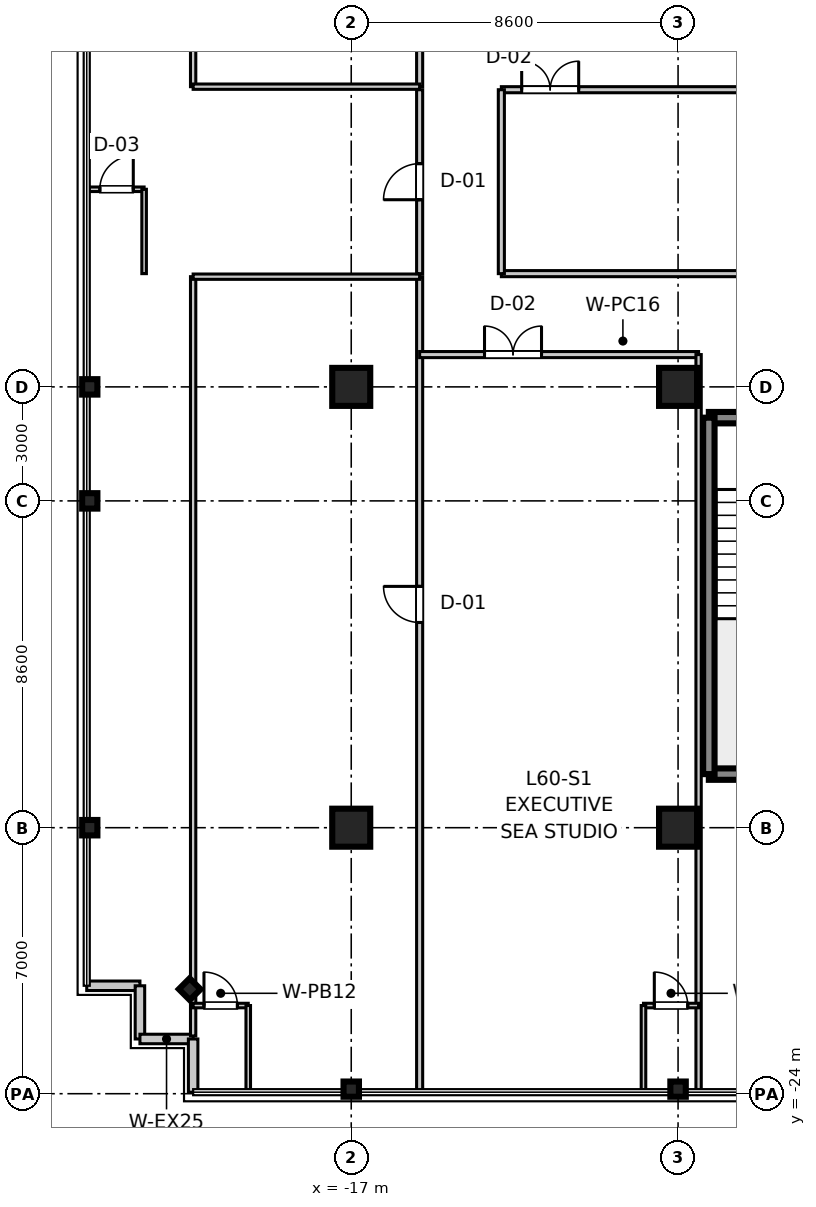
"""IFC4 building model, lengths in metres.
Left out: names, types, materials, properties, quantities, classifications, styles, units other than length and angle.
Written with IfcOpenShell. Run it as: python <this file> out.ifc"""

import sys

from ifc_helpers import new_model, si_unit, direction, frame, frame_2d, origin, origin_2d, place, context, subcontext, project, spatial, rectangle, i_section, extrude, source, transform, mapped, element, fill, save


model = new_model("IFC4")
c1 = context("Model", 3, precision=1e-05, world=origin(), true_north=direction((0.0, 1.0)))
c2 = subcontext(c1, "Body", "Model", "MODEL_VIEW")
j1 = project(units=[si_unit("LENGTHUNIT", "METRE"), si_unit("PLANEANGLEUNIT", "RADIAN")], contexts=[c1])
p1 = place(None, origin())
s1 = spatial("IfcSite", under=j1, at=p1, CompositionType="ELEMENT")
p2 = place(p1, origin())
s2 = spatial("IfcBuilding", under=s1, at=p2, CompositionType="ELEMENT")
p3 = place(p2, frame((0.0, 0.0, 234.5)))
s3 = spatial("IfcBuildingStorey", under=s2, at=p3, CompositionType="ELEMENT", Elevation=234.5)
m1 = source(origin(), c2, "Body", "SweptSolid", [
    extrude(rectangle(XDim=1.0, YDim=1.0, at=origin_2d()), origin(), (0.0, 0.0, 1.0), 3.655),
])
for number, where, z_axis, x_axis in (
    (1, (-17.0, -17.0, 0.0), (0.0, 0.0, 1.0), (1.0, 0.0, 0.0)),
    (2, (-17.0, -5.4, 0.0), (0.0, 0.0, 1.0), (1.0, 0.0, 0.0)),
    (3, (-8.4, -17.0, 0.0), (0.0, 0.0, 1.0), (1.0, 0.0, 0.0)),
    (4, (-8.4, -5.4, 0.0), (0.0, 0.0, 1.0), (1.0, 0.0, 0.0)),
):
    element("IfcColumn", number, at=place(p3, frame(where, z_axis=z_axis, x_axis=x_axis)), inside=s3, PredefinedType="COLUMN", context=c2, shape_type="MappedRepresentation", body=[
        mapped(m1, transform((0.0, 0.0, 0.0), scale=1.0)),
    ])
m2 = source(origin(), c2, "Body", "SweptSolid", [
    extrude(i_section(OverallWidth=0.401, OverallDepth=0.406, WebThickness=0.016, FlangeThickness=0.025, at=origin_2d()), origin(), (0.0, 0.0, 1.0), 3.655),
])
for number, where, z_axis, x_axis in (
    (5, (-23.88, -17.0, 0.0), (0.0, 0.0, 1.0), (1.0, 0.0, 0.0)),
    (6, (-23.88, -8.4, 0.0), (0.0, 0.0, 1.0), (1.0, 0.0, 0.0)),
    (7, (-23.88, -5.4, 0.0), (0.0, 0.0, 1.0), (1.0, 0.0, 0.0)),
    (8, (-17.0, -23.88, 0.0), (0.0, 0.0, 1.0), (0.0, 1.0, 0.0)),
    (9, (-8.4, -23.88, 0.0), (0.0, 0.0, 1.0), (0.0, 1.0, 0.0)),
    (10, (-21.25, -21.25, 0.0), (0.0, 0.0, 1.0), (0.707, 0.707, 0.0)),
):
    element("IfcColumn", number, at=place(p3, frame(where, z_axis=z_axis, x_axis=x_axis)), inside=s3, PredefinedType="COLUMN", context=c2, shape_type="MappedRepresentation", body=[
        mapped(m2, transform((0.0, 0.0, 0.0), scale=1.0)),
    ])
m3 = source(origin(), c2, "Body", "SweptSolid", [
    extrude(rectangle(XDim=3.98, YDim=0.3, at=frame_2d((1.99, 0.0))), origin(), (0.0, 0.0, 1.0), 3.41),
])
p4 = place(p3, frame((-7.59, -15.59, 0.0), z_axis=(0.0, 0.0, 1.0), x_axis=(1.0, 0.0, 0.0)))
e11 = element("IfcWall", 11, at=p4, inside=s3, PredefinedType="SHEAR", context=c2, shape_type="MappedRepresentation", body=[
    mapped(m3, transform((0.0, 0.0, 0.0), scale=1.0)),
])
p5 = place(p3, frame((-7.59, -6.21, 0.0), z_axis=(0.0, 0.0, 1.0), x_axis=(1.0, 0.0, 0.0)))
e12 = element("IfcWall", 12, at=p5, inside=s3, PredefinedType="SHEAR", context=c2, shape_type="MappedRepresentation", body=[
    mapped(m3, transform((0.0, 0.0, 0.0), scale=1.0)),
])
p6 = place(p5, frame((1.44, 0.0, 0.0)))
e13 = element("IfcOpeningElement", 13, at=p6, cuts=e12, PredefinedType="OPENING", context=c2, shape_type="SweptSolid", body=[
    extrude(rectangle(XDim=1.1, YDim=2.15, at=frame_2d((0.55, 1.075))), frame((0.0, 0.16, 0.0), z_axis=(0.0, -1.0, 0.0), x_axis=(1.0, 0.0, 0.0)), (0.0, 0.0, 1.0), 0.32),
])
m4 = source(origin(), c2, "Body", "SweptSolid", [
    extrude(rectangle(XDim=9.38, YDim=0.3, at=frame_2d((4.69, 0.0))), origin(), (0.0, 0.0, 1.0), 3.41),
])
p7 = place(p3, frame((-7.59, -15.59, 0.0), z_axis=(0.0, 0.0, 1.0), x_axis=(0.0, 1.0, 0.0)))
e14 = element("IfcWall", 14, at=p7, inside=s3, PredefinedType="SHEAR", context=c2, shape_type="MappedRepresentation", body=[
    mapped(m4, transform((0.0, 0.0, 0.0), scale=1.0)),
])
m5 = source(origin(), c2, "Body", "SweptSolid", [
    extrude(rectangle(XDim=1.4, YDim=0.25, at=frame_2d((0.7, 0.0))), origin(), (0.0, 0.0, 1.0), 3.41),
])
p8 = place(p3, frame((-23.96, -21.16, 0.0), z_axis=(0.0, 0.0, 1.0), x_axis=(1.0, 0.0, 0.0)))
e15 = element("IfcWall", 15, at=p8, inside=s3, PredefinedType="STANDARD", context=c2, shape_type="MappedRepresentation", body=[
    mapped(m5, transform((0.0, 0.0, 0.0), scale=1.0)),
])
m6 = source(origin(), c2, "Body", "SweptSolid", [
    extrude(rectangle(XDim=1.4, YDim=0.25, at=frame_2d((0.7, 0.0))), origin(), (0.0, 0.0, 1.0), 3.41),
])
for number, where, z_axis, x_axis in (
    (16, (-22.56, -22.56, 0.0), (0.0, 0.0, 1.0), (0.0, 1.0, 0.0)),
    (17, (-22.56, -22.56, 0.0), (0.0, 0.0, 1.0), (1.0, 0.0, 0.0)),
):
    element("IfcWall", number, at=place(p3, frame(where, z_axis=z_axis, x_axis=x_axis)), inside=s3, PredefinedType="STANDARD", context=c2, shape_type="MappedRepresentation", body=[
        mapped(m6, transform((0.0, 0.0, 0.0), scale=1.0)),
    ])
p9 = place(p3, frame((-21.16, -23.96, 0.0), z_axis=(0.0, 0.0, 1.0), x_axis=(0.0, 1.0, 0.0)))
e18 = element("IfcWall", 18, at=p9, inside=s3, PredefinedType="STANDARD", context=c2, shape_type="MappedRepresentation", body=[
    mapped(m5, transform((0.0, 0.0, 0.0), scale=1.0)),
])
m7 = source(origin(), c2, "Body", "SweptSolid", [
    extrude(rectangle(XDim=21.4, YDim=0.16, at=frame_2d((10.7, 0.0))), origin(), (0.0, 0.0, 1.0), 2.75),
])
p10 = place(p3, frame((-15.2, 2.5, 0.0), z_axis=(0.0, 0.0, 1.0), x_axis=(0.0, 1.0, 0.0)))
e19 = element("IfcWall", 19, at=p10, inside=s3, PredefinedType="PARTITIONING", context=c2, shape_type="MappedRepresentation", body=[
    mapped(m7, transform((0.0, 0.0, 0.0), scale=1.0)),
])
p11 = place(p10, frame((8.15, 0.0, 0.0)))
e20 = element("IfcOpeningElement", 20, at=p11, cuts=e19, PredefinedType="OPENING", context=c2, shape_type="SweptSolid", body=[
    extrude(rectangle(XDim=0.95, YDim=2.1, at=frame_2d((0.475, 1.05))), frame((0.0, 0.09, 0.0), z_axis=(0.0, -1.0, 0.0), x_axis=(1.0, 0.0, 0.0)), (0.0, 0.0, 1.0), 0.18),
])
m8 = source(origin(), c2, "Body", "SweptSolid", [
    extrude(rectangle(XDim=19.98, YDim=0.14, at=frame_2d((9.99, 0.0))), origin(), (0.0, 0.0, 1.0), 2.75),
])
p12 = place(p3, frame((-21.16, 2.5, 0.0), z_axis=(0.0, 0.0, 1.0), x_axis=(0.0, 1.0, 0.0)))
e21 = element("IfcWall", 21, at=p12, inside=s3, PredefinedType="PARTITIONING", context=c2, shape_type="MappedRepresentation", body=[
    mapped(m8, transform((0.0, 0.0, 0.0), scale=1.0)),
])
m9 = source(origin(), c2, "Body", "SweptSolid", [
    extrude(rectangle(XDim=5.96, YDim=0.14, at=frame_2d((2.98, 0.0))), origin(), (0.0, 0.0, 1.0), 2.75),
])
p13 = place(p3, frame((-21.16, 2.5, 0.0), z_axis=(0.0, 0.0, 1.0), x_axis=(1.0, 0.0, 0.0)))
e22 = element("IfcWall", 22, at=p13, inside=s3, PredefinedType="PARTITIONING", context=c2, shape_type="MappedRepresentation", body=[
    mapped(m9, transform((0.0, 0.0, 0.0), scale=1.0)),
])
p14 = place(p3, frame((-15.2, -23.9, 0.0), z_axis=(0.0, 0.0, 1.0), x_axis=(0.0, 1.0, 0.0)))
e23 = element("IfcWall", 23, at=p14, inside=s3, PredefinedType="PARTITIONING", context=c2, shape_type="MappedRepresentation", body=[
    mapped(m7, transform((0.0, 0.0, 0.0), scale=1.0)),
])
p15 = place(p14, frame((12.3, 0.0, 0.0)))
e24 = element("IfcOpeningElement", 24, at=p15, cuts=e23, PredefinedType="OPENING", context=c2, shape_type="SweptSolid", body=[
    extrude(rectangle(XDim=0.95, YDim=2.1, at=frame_2d((0.475, 1.05))), frame((0.0, 0.09, 0.0), z_axis=(0.0, -1.0, 0.0), x_axis=(1.0, 0.0, 0.0)), (0.0, 0.0, 1.0), 0.18),
])
p16 = place(p3, frame((-21.16, -22.48, 0.0), z_axis=(0.0, 0.0, 1.0), x_axis=(0.0, 1.0, 0.0)))
e25 = element("IfcWall", 25, at=p16, inside=s3, PredefinedType="PARTITIONING", context=c2, shape_type="MappedRepresentation", body=[
    mapped(m8, transform((0.0, 0.0, 0.0), scale=1.0)),
])
p17 = place(p3, frame((-21.16, -2.5, 0.0), z_axis=(0.0, 0.0, 1.0), x_axis=(1.0, 0.0, 0.0)))
e26 = element("IfcWall", 26, at=p17, inside=s3, PredefinedType="PARTITIONING", context=c2, shape_type="MappedRepresentation", body=[
    mapped(m9, transform((0.0, 0.0, 0.0), scale=1.0)),
])
m10 = source(origin(), c2, "Body", "SweptSolid", [
    extrude(rectangle(XDim=1.45, YDim=0.12, at=frame_2d((0.725, 0.0))), origin(), (0.0, 0.0, 1.0), 2.75),
])
p18 = place(p3, frame((-21.16, -21.68, 0.0), z_axis=(0.0, 0.0, 1.0), x_axis=(1.0, 0.0, 0.0)))
e27 = element("IfcWall", 27, at=p18, inside=s3, PredefinedType="PARTITIONING", context=c2, shape_type="MappedRepresentation", body=[
    mapped(m10, transform((0.0, 0.0, 0.0), scale=1.0)),
])
p19 = place(p18, frame((0.285, 0.0, 0.0)))
e28 = element("IfcOpeningElement", 28, at=p19, cuts=e27, PredefinedType="OPENING", context=c2, shape_type="SweptSolid", body=[
    extrude(rectangle(XDim=0.88, YDim=2.1, at=frame_2d((0.44, 1.05))), frame((0.0, 0.07, 0.0), z_axis=(0.0, -1.0, 0.0), x_axis=(1.0, 0.0, 0.0)), (0.0, 0.0, 1.0), 0.14),
])
m11 = source(origin(), c2, "Body", "SweptSolid", [
    extrude(rectangle(XDim=2.22, YDim=0.12, at=frame_2d((1.11, 0.0))), origin(), (0.0, 0.0, 1.0), 2.75),
])
p20 = place(p3, frame((-19.71, -23.9, 0.0), z_axis=(0.0, 0.0, 1.0), x_axis=(0.0, 1.0, 0.0)))
e29 = element("IfcWall", 29, at=p20, inside=s3, PredefinedType="PARTITIONING", context=c2, shape_type="MappedRepresentation", body=[
    mapped(m11, transform((0.0, 0.0, 0.0), scale=1.0)),
])
m12 = source(origin(), c2, "Body", "SweptSolid", [
    extrude(rectangle(XDim=7.34, YDim=0.16, at=frame_2d((3.67, 0.0))), origin(), (0.0, 0.0, 1.0), 2.75),
])
p21 = place(p3, frame((-15.2, -4.55, 0.0), z_axis=(0.0, 0.0, 1.0), x_axis=(1.0, 0.0, 0.0)))
e30 = element("IfcWall", 30, at=p21, inside=s3, PredefinedType="PARTITIONING", context=c2, shape_type="MappedRepresentation", body=[
    mapped(m12, transform((0.0, 0.0, 0.0), scale=1.0)),
])
p22 = place(p21, frame((1.707, 0.0, 0.0)))
e31 = element("IfcOpeningElement", 31, at=p22, cuts=e30, PredefinedType="OPENING", context=c2, shape_type="SweptSolid", body=[
    extrude(rectangle(XDim=1.5, YDim=2.15, at=frame_2d((0.75, 1.075))), frame((0.0, 0.09, 0.0), z_axis=(0.0, -1.0, 0.0), x_axis=(1.0, 0.0, 0.0)), (0.0, 0.0, 1.0), 0.18),
])
m13 = source(origin(), c2, "Body", "SweptSolid", [
    extrude(rectangle(XDim=19.35, YDim=0.14, at=frame_2d((9.675, 0.0))), origin(), (0.0, 0.0, 1.0), 2.75),
])
p23 = place(p3, frame((-7.86, -23.9, 0.0), z_axis=(0.0, 0.0, 1.0), x_axis=(0.0, 1.0, 0.0)))
e32 = element("IfcWall", 32, at=p23, inside=s3, PredefinedType="PARTITIONING", context=c2, shape_type="MappedRepresentation", body=[
    mapped(m13, transform((0.0, 0.0, 0.0), scale=1.0)),
])
p24 = place(p3, frame((-9.31, -21.68, 0.0), z_axis=(0.0, 0.0, 1.0), x_axis=(1.0, 0.0, 0.0)))
e33 = element("IfcWall", 33, at=p24, inside=s3, PredefinedType="PARTITIONING", context=c2, shape_type="MappedRepresentation", body=[
    mapped(m10, transform((0.0, 0.0, 0.0), scale=1.0)),
])
p25 = place(p24, frame((0.285, 0.0, 0.0)))
e34 = element("IfcOpeningElement", 34, at=p25, cuts=e33, PredefinedType="OPENING", context=c2, shape_type="SweptSolid", body=[
    extrude(rectangle(XDim=0.88, YDim=2.1, at=frame_2d((0.44, 1.05))), frame((0.0, 0.07, 0.0), z_axis=(0.0, -1.0, 0.0), x_axis=(1.0, 0.0, 0.0)), (0.0, 0.0, 1.0), 0.14),
])
p26 = place(p3, frame((-9.31, -23.9, 0.0), z_axis=(0.0, 0.0, 1.0), x_axis=(0.0, 1.0, 0.0)))
e35 = element("IfcWall", 35, at=p26, inside=s3, PredefinedType="PARTITIONING", context=c2, shape_type="MappedRepresentation", body=[
    mapped(m11, transform((0.0, 0.0, 0.0), scale=1.0)),
])
m14 = source(origin(), c2, "Body", "SweptSolid", [
    extrude(rectangle(XDim=4.84, YDim=0.16, at=frame_2d((2.42, 0.0))), origin(), (0.0, 0.0, 1.0), 2.75),
])
p27 = place(p3, frame((-15.2, -2.42, 0.0), z_axis=(0.0, 0.0, 1.0), x_axis=(0.0, 1.0, 0.0)))
e36 = element("IfcWall", 36, at=p27, inside=s3, PredefinedType="PARTITIONING", context=c2, shape_type="MappedRepresentation", body=[
    mapped(m14, transform((0.0, 0.0, 0.0), scale=1.0)),
])
p28 = place(p27, frame((1.945, 0.0, 0.0)))
e37 = element("IfcOpeningElement", 37, at=p28, cuts=e36, PredefinedType="OPENING", context=c2, shape_type="SweptSolid", body=[
    extrude(rectangle(XDim=0.95, YDim=2.1, at=frame_2d((0.475, 1.05))), frame((0.0, 0.09, 0.0), z_axis=(0.0, -1.0, 0.0), x_axis=(1.0, 0.0, 0.0)), (0.0, 0.0, 1.0), 0.18),
])
p29 = place(p3, frame((-23.9, -0.2, 0.0), z_axis=(0.0, 0.0, 1.0), x_axis=(1.0, 0.0, 0.0)))
e38 = element("IfcWall", 38, at=p29, inside=s3, PredefinedType="PARTITIONING", context=c2, shape_type="MappedRepresentation", body=[
    mapped(m10, transform((0.0, 0.0, 0.0), scale=1.0)),
])
p30 = place(p29, frame((0.285, 0.0, 0.0)))
e39 = element("IfcOpeningElement", 39, at=p30, cuts=e38, PredefinedType="OPENING", context=c2, shape_type="SweptSolid", body=[
    extrude(rectangle(XDim=0.88, YDim=2.1, at=frame_2d((0.44, 1.05))), frame((0.0, 0.07, 0.0), z_axis=(0.0, -1.0, 0.0), x_axis=(1.0, 0.0, 0.0)), (0.0, 0.0, 1.0), 0.14),
])
p31 = place(p3, frame((-22.45, -2.42, 0.0), z_axis=(0.0, 0.0, 1.0), x_axis=(0.0, 1.0, 0.0)))
e40 = element("IfcWall", 40, at=p31, inside=s3, PredefinedType="PARTITIONING", context=c2, shape_type="MappedRepresentation", body=[
    mapped(m11, transform((0.0, 0.0, 0.0), scale=1.0)),
])
m15 = source(origin(), c2, "Body", "SweptSolid", [
    extrude(rectangle(XDim=20.4, YDim=0.16, at=frame_2d((10.2, 0.0))), origin(), (0.0, 0.0, 1.0), 2.75),
])
p32 = place(p3, frame((-13.05, -2.42, 0.0), z_axis=(0.0, 0.0, 1.0), x_axis=(1.0, 0.0, 0.0)))
e41 = element("IfcWall", 41, at=p32, inside=s3, PredefinedType="PARTITIONING", context=c2, shape_type="MappedRepresentation", body=[
    mapped(m15, transform((0.0, 0.0, 0.0), scale=1.0)),
])
p33 = place(p3, frame((-13.05, 2.42, 0.0), z_axis=(0.0, 0.0, 1.0), x_axis=(1.0, 0.0, 0.0)))
e42 = element("IfcWall", 42, at=p33, inside=s3, PredefinedType="PARTITIONING", context=c2, shape_type="MappedRepresentation", body=[
    mapped(m15, transform((0.0, 0.0, 0.0), scale=1.0)),
])
p34 = place(p33, frame((0.535, 0.0, 0.0)))
e43 = element("IfcOpeningElement", 43, at=p34, cuts=e42, PredefinedType="OPENING", context=c2, shape_type="SweptSolid", body=[
    extrude(rectangle(XDim=1.5, YDim=2.15, at=frame_2d((0.75, 1.075))), frame((0.0, 0.09, 0.0), z_axis=(0.0, -1.0, 0.0), x_axis=(1.0, 0.0, 0.0)), (0.0, 0.0, 1.0), 0.18),
])
p35 = place(p3, frame((-13.05, -2.42, 0.0), z_axis=(0.0, 0.0, 1.0), x_axis=(0.0, 1.0, 0.0)))
e44 = element("IfcWall", 44, at=p35, inside=s3, PredefinedType="PARTITIONING", context=c2, shape_type="MappedRepresentation", body=[
    mapped(m14, transform((0.0, 0.0, 0.0), scale=1.0)),
])
m16 = source(origin(), c2, "Body", "SweptSolid", [
    extrude(rectangle(XDim=0.88, YDim=2.1, at=frame_2d((0.44, 1.05))), frame((0.0, 0.025, 0.0), z_axis=(0.0, -1.0, 0.0), x_axis=(1.0, 0.0, 0.0)), (0.0, 0.0, 1.0), 0.05),
])
p36 = place(p19, frame((0.88, 0.0, 0.0), z_axis=(0.0, 0.0, 1.0), x_axis=(-1.0, 0.0, 0.0)))
e45 = element("IfcDoor", 45, at=p36, inside=s3, OperationType="SINGLE_SWING_LEFT", PredefinedType="DOOR", context=c2, shape_type="MappedRepresentation", body=[
    mapped(m16, transform((0.0, 0.0, 0.0), scale=1.0)),
])
fill(e28, e45)
m17 = source(origin(), c2, "Body", "SweptSolid", [
    extrude(rectangle(XDim=0.95, YDim=2.1, at=frame_2d((0.475, 1.05))), frame((0.0, 0.025, 0.0), z_axis=(0.0, -1.0, 0.0), x_axis=(1.0, 0.0, 0.0)), (0.0, 0.0, 1.0), 0.05),
])
p37 = place(p15, origin())
e46 = element("IfcDoor", 46, at=p37, inside=s3, OperationType="SINGLE_SWING_RIGHT", PredefinedType="DOOR", context=c2, shape_type="MappedRepresentation", body=[
    mapped(m17, transform((0.0, 0.0, 0.0), scale=1.0)),
])
fill(e24, e46)
p38 = place(p25, frame((0.88, 0.0, 0.0), z_axis=(0.0, 0.0, 1.0), x_axis=(-1.0, 0.0, 0.0)))
e47 = element("IfcDoor", 47, at=p38, inside=s3, OperationType="SINGLE_SWING_LEFT", PredefinedType="DOOR", context=c2, shape_type="MappedRepresentation", body=[
    mapped(m16, transform((0.0, 0.0, 0.0), scale=1.0)),
])
fill(e34, e47)
m18 = source(origin(), c2, "Body", "SweptSolid", [
    extrude(rectangle(XDim=1.5, YDim=2.15, at=frame_2d((0.75, 1.075))), frame((0.0, 0.025, 0.0), z_axis=(0.0, -1.0, 0.0), x_axis=(1.0, 0.0, 0.0)), (0.0, 0.0, 1.0), 0.05),
])
p39 = place(p22, frame((1.5, 0.0, 0.0), z_axis=(0.0, 0.0, 1.0), x_axis=(-1.0, 0.0, 0.0)))
e48 = element("IfcDoor", 48, at=p39, inside=s3, OperationType="DOUBLE_DOOR_SINGLE_SWING", PredefinedType="DOOR", context=c2, shape_type="MappedRepresentation", body=[
    mapped(m18, transform((0.0, 0.0, 0.0), scale=1.0)),
])
fill(e31, e48)
p40 = place(p30, frame((0.88, 0.0, 0.0), z_axis=(0.0, 0.0, 1.0), x_axis=(-1.0, 0.0, 0.0)))
e49 = element("IfcDoor", 49, at=p40, inside=s3, OperationType="SINGLE_SWING_RIGHT", PredefinedType="DOOR", context=c2, shape_type="MappedRepresentation", body=[
    mapped(m16, transform((0.0, 0.0, 0.0), scale=1.0)),
])
fill(e39, e49)
p41 = place(p28, origin())
e50 = element("IfcDoor", 50, at=p41, inside=s3, OperationType="SINGLE_SWING_LEFT", PredefinedType="DOOR", context=c2, shape_type="MappedRepresentation", body=[
    mapped(m17, transform((0.0, 0.0, 0.0), scale=1.0)),
])
fill(e37, e50)
p42 = place(p34, frame((1.5, 0.0, 0.0), z_axis=(0.0, 0.0, 1.0), x_axis=(-1.0, 0.0, 0.0)))
e51 = element("IfcDoor", 51, at=p42, inside=s3, OperationType="DOUBLE_DOOR_SINGLE_SWING", PredefinedType="DOOR", context=c2, shape_type="MappedRepresentation", body=[
    mapped(m18, transform((0.0, 0.0, 0.0), scale=1.0)),
])
fill(e43, e51)
save(model, sys.argv[1])
